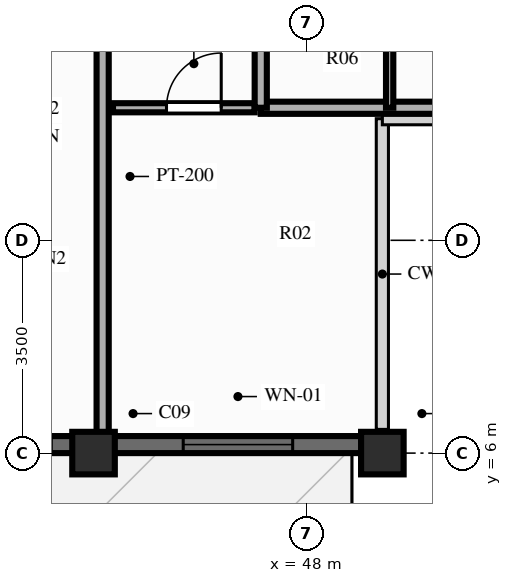
"""IFC4 building model, lengths in metres.
Left out: names, types, materials, properties, quantities, classifications, styles, units other than length and angle.
Written with IfcOpenShell. Run it as: python <this file> out.ifc"""

import sys

from ifc_helpers import new_model, si_unit, direction, frame, frame_2d, origin, origin_2d, place, context, subcontext, project, spatial, rectangle, extrude, source, transform, mapped, element, fill, save


model = new_model("IFC4")
c1 = context("Model", 3, precision=1e-05, world=origin(), true_north=direction((0.0, 1.0)))
c2 = subcontext(c1, "Body", "Model", "MODEL_VIEW")
j1 = project(units=[si_unit("LENGTHUNIT", "METRE"), si_unit("PLANEANGLEUNIT", "RADIAN")], contexts=[c1])
p1 = place(None, origin())
s1 = spatial("IfcSite", under=j1, at=p1, CompositionType="ELEMENT")
p2 = place(p1, origin())
s2 = spatial("IfcBuilding", under=s1, at=p2, CompositionType="ELEMENT")
p3 = place(p2, frame((0.0, 0.0, 226.2)))
s3 = spatial("IfcBuildingStorey", under=s2, at=p3, CompositionType="ELEMENT", Elevation=226.2)
m1 = source(origin(), c2, "Body", "SweptSolid", [
    extrude(rectangle(XDim=0.7, YDim=0.7, at=origin_2d()), origin(), (0.0, 0.0, 1.0), 3.9),
])
for number, where, z_axis, x_axis in (
    (1, (44.5, 6.0, 0.0), (0.0, 0.0, 1.0), (1.0, 0.0, 0.0)),
    (2, (49.25, 6.0, 0.0), (0.0, 0.0, 1.0), (1.0, 0.0, 0.0)),
):
    element("IfcColumn", number, at=place(p3, frame(where, z_axis=z_axis, x_axis=x_axis)), inside=s3, PredefinedType="COLUMN", context=c2, shape_type="MappedRepresentation", body=[
        mapped(m1, transform((0.0, 0.0, 0.0), scale=1.0)),
    ])
p4 = place(p3, frame((26.75, 6.14, 0.0), z_axis=(0.0, 0.0, 1.0), x_axis=(1.0, 0.0, 0.0)))
e3 = element("IfcWall", 3, at=p4, inside=s3, PredefinedType="SOLIDWALL", context=c2, shape_type="SweptSolid", body=[
    extrude(rectangle(XDim=22.5, YDim=0.28, at=frame_2d((11.25, 0.0))), origin(), (0.0, 0.0, 1.0), 2.79),
])
p5 = place(p4, frame((1.475, 0.0, 0.85)))
e4 = element("IfcOpeningElement", 4, at=p5, cuts=e3, PredefinedType="OPENING", context=c2, shape_type="SweptSolid", body=[
    extrude(rectangle(XDim=1.8, YDim=1.65, at=frame_2d((0.9, 0.825))), frame((0.0, 0.152, 0.0), z_axis=(0.0, -1.0, 0.0), x_axis=(1.0, 0.0, 0.0)), (0.0, 0.0, 1.0), 0.304),
])
p6 = place(p4, frame((5.445, 0.0, 0.85)))
e5 = element("IfcOpeningElement", 5, at=p6, cuts=e3, PredefinedType="OPENING", context=c2, shape_type="SweptSolid", body=[
    extrude(rectangle(XDim=1.5, YDim=1.65, at=frame_2d((0.75, 0.825))), frame((0.0, 0.152, 0.0), z_axis=(0.0, -1.0, 0.0), x_axis=(1.0, 0.0, 0.0)), (0.0, 0.0, 1.0), 0.304),
])
p7 = place(p4, frame((8.45, 0.0, 0.85)))
e6 = element("IfcOpeningElement", 6, at=p7, cuts=e3, PredefinedType="OPENING", context=c2, shape_type="SweptSolid", body=[
    extrude(rectangle(XDim=1.8, YDim=1.65, at=frame_2d((0.9, 0.825))), frame((0.0, 0.152, 0.0), z_axis=(0.0, -1.0, 0.0), x_axis=(1.0, 0.0, 0.0)), (0.0, 0.0, 1.0), 0.304),
])
p8 = place(p4, frame((13.7, 0.0, 0.0), z_axis=(0.0, 0.0, 1.0), x_axis=(-1.0, 0.0, 0.0)))
e7 = element("IfcOpeningElement", 7, at=p8, cuts=e3, PredefinedType="OPENING", context=c2, shape_type="SweptSolid", body=[
    extrude(rectangle(XDim=1.1, YDim=2.15, at=frame_2d((0.55, 1.075))), frame((0.0, 0.152, 0.0), z_axis=(0.0, -1.0, 0.0), x_axis=(1.0, 0.0, 0.0)), (0.0, 0.0, 1.0), 0.304),
])
p9 = place(p4, frame((15.555, 0.0, 0.85)))
e8 = element("IfcOpeningElement", 8, at=p9, cuts=e3, PredefinedType="OPENING", context=c2, shape_type="SweptSolid", body=[
    extrude(rectangle(XDim=1.5, YDim=1.65, at=frame_2d((0.75, 0.825))), frame((0.0, 0.152, 0.0), z_axis=(0.0, -1.0, 0.0), x_axis=(1.0, 0.0, 0.0)), (0.0, 0.0, 1.0), 0.304),
])
p10 = place(p4, frame((19.225, 0.0, 0.85)))
e9 = element("IfcOpeningElement", 9, at=p10, cuts=e3, PredefinedType="OPENING", context=c2, shape_type="SweptSolid", body=[
    extrude(rectangle(XDim=1.8, YDim=1.65, at=frame_2d((0.9, 0.825))), frame((0.0, 0.152, 0.0), z_axis=(0.0, -1.0, 0.0), x_axis=(1.0, 0.0, 0.0)), (0.0, 0.0, 1.0), 0.304),
])
p11 = place(p3, frame((44.82, 11.68, 0.0), z_axis=(0.0, 0.0, 1.0), x_axis=(1.0, 0.0, 0.0)))
e10 = element("IfcWall", 10, at=p11, inside=s3, PredefinedType="PARTITIONING", context=c2, shape_type="SweptSolid", body=[
    extrude(rectangle(XDim=2.33, YDim=0.15, at=frame_2d((1.165, 0.0))), origin(), (0.0, 0.0, 1.0), 3.69),
])
p12 = place(p11, frame((0.88, 0.0, 0.0)))
e11 = element("IfcOpeningElement", 11, at=p12, cuts=e10, PredefinedType="OPENING", context=c2, shape_type="SweptSolid", body=[
    extrude(rectangle(XDim=0.9, YDim=2.1, at=frame_2d((0.45, 1.05))), frame((0.0, 0.087, 0.0), z_axis=(0.0, -1.0, 0.0), x_axis=(1.0, 0.0, 0.0)), (0.0, 0.0, 1.0), 0.174),
])
p13 = place(p3, frame((44.65, 14.95, 0.0), z_axis=(0.0, 0.0, 1.0), x_axis=(0.0, -1.0, 0.0)))
e12 = element("IfcWall", 12, at=p13, inside=s3, PredefinedType="PARTITIONING", context=c2, shape_type="SweptSolid", body=[
    extrude(rectangle(XDim=8.8, YDim=0.2, at=frame_2d((4.4, 0.0))), origin(), (0.0, 0.0, 1.0), 2.79),
])
p14 = place(p3, frame((47.25, 11.68, 0.0), z_axis=(0.0, 0.0, 1.0), x_axis=(1.0, 0.0, 0.0)))
e13 = element("IfcWall", 13, at=p14, inside=s3, PredefinedType="PARTITIONING", context=c2, shape_type="SweptSolid", body=[
    extrude(rectangle(XDim=7.35, YDim=0.2, at=frame_2d((3.675, 0.0))), origin(), (0.0, 0.0, 1.0), 3.69),
])
p15 = place(p3, frame((47.25, 11.68, 0.0), z_axis=(0.0, 0.0, 1.0), x_axis=(0.0, 1.0, 0.0)))
e14 = element("IfcWall", 14, at=p15, inside=s3, PredefinedType="PARTITIONING", context=c2, shape_type="SweptSolid", body=[
    extrude(rectangle(XDim=2.75, YDim=0.2, at=frame_2d((1.375, 0.0))), origin(), (0.0, 0.0, 1.0), 3.69),
])
p16 = place(p3, frame((49.37, 11.68, 0.0), z_axis=(0.0, 0.0, 1.0), x_axis=(0.0, 1.0, 0.0)))
e15 = element("IfcWall", 15, at=p16, inside=s3, PredefinedType="PARTITIONING", context=c2, shape_type="SweptSolid", body=[
    extrude(rectangle(XDim=2.75, YDim=0.12, at=frame_2d((1.375, 0.0))), origin(), (0.0, 0.0, 1.0), 3.69),
])
m2 = source(origin(), c2, "Body", "SweptSolid", [
    extrude(rectangle(XDim=1.8, YDim=1.65, at=frame_2d((0.9, 0.825))), frame((0.0, 0.03, 0.0), z_axis=(0.0, -1.0, 0.0), x_axis=(1.0, 0.0, 0.0)), (0.0, 0.0, 1.0), 0.06),
])
p17 = place(p10, origin())
e16 = element("IfcWindow", 16, at=p17, inside=s3, PartitioningType="SINGLE_PANEL", PredefinedType="WINDOW", context=c2, shape_type="MappedRepresentation", body=[
    mapped(m2, transform((0.0, 0.0, 0.0), scale=1.0)),
])
fill(e9, e16)
m3 = source(origin(), c2, "Body", "SweptSolid", [
    extrude(rectangle(XDim=0.9, YDim=2.1, at=frame_2d((0.45, 1.05))), frame((0.0, 0.025, 0.0), z_axis=(0.0, -1.0, 0.0), x_axis=(1.0, 0.0, 0.0)), (0.0, 0.0, 1.0), 0.05),
])
p18 = place(p12, origin())
e17 = element("IfcDoor", 17, at=p18, inside=s3, OperationType="SINGLE_SWING_RIGHT", PredefinedType="DOOR", context=c2, shape_type="MappedRepresentation", body=[
    mapped(m3, transform((0.0, 0.0, 0.0), scale=1.0)),
])
fill(e11, e17)
save(model, sys.argv[1])
